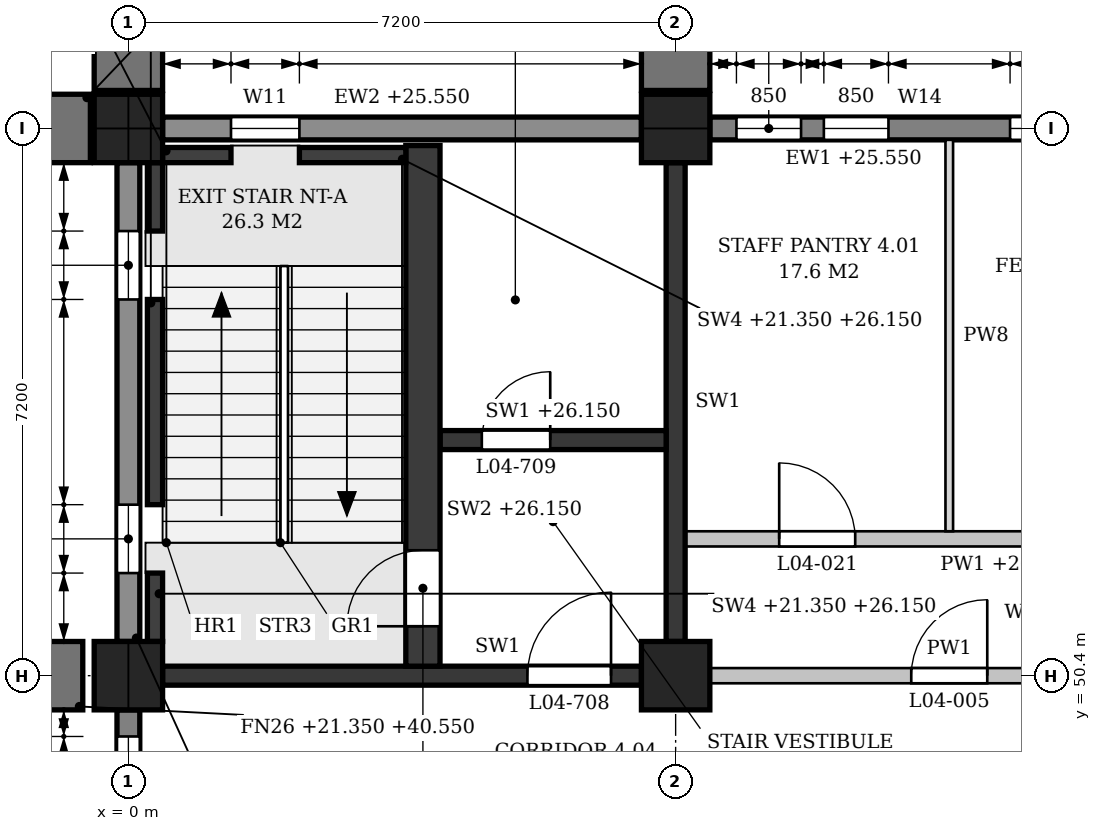
"""IFC4 building model, lengths in metres.
Left out: names, types, materials, properties, quantities, classifications, styles, units other than length and angle.
Written with IfcOpenShell. Run it as: python <this file> out.ifc"""

import sys

from ifc_helpers import new_model, si_unit, direction, frame, frame_2d, origin, origin_2d, place, context, subcontext, project, spatial, polyline, rectangle, outline, extrude, element, fill, save


model = new_model("IFC4")
c1 = context("Model", 3, precision=1e-05, world=origin(), true_north=direction((0.0, 1.0)))
c2 = subcontext(c1, "Body", "Model", "MODEL_VIEW")
j1 = project(units=[si_unit("LENGTHUNIT", "METRE"), si_unit("PLANEANGLEUNIT", "RADIAN")], contexts=[c1])
p1 = place(None, origin())
s1 = spatial("IfcSite", under=j1, at=p1, CompositionType="ELEMENT")
p2 = place(p1, origin())
s2 = spatial("IfcBuilding", under=s1, at=p2, CompositionType="ELEMENT")
p3 = place(p2, frame((0.0, 0.0, 21.6)))
s3 = spatial("IfcBuildingStorey", under=s2, at=p3, CompositionType="ELEMENT", Elevation=21.6)
for number, where, z_axis, x_axis in (
    (1, (0.0, 50.4, 0.0), (0.0, 0.0, 1.0), (1.0, 0.0, 0.0)),
    (2, (0.0, 57.6, 0.0), (0.0, 0.0, 1.0), (1.0, 0.0, 0.0)),
    (3, (7.2, 50.4, 0.0), (0.0, 0.0, 1.0), (1.0, 0.0, 0.0)),
    (4, (7.2, 57.6, 0.0), (0.0, 0.0, 1.0), (1.0, 0.0, 0.0)),
):
    element("IfcColumn", number, at=place(p3, frame(where, z_axis=z_axis, x_axis=x_axis)), inside=s3, PredefinedType="COLUMN", context=c2, shape_type="SweptSolid", body=[
        extrude(rectangle(XDim=0.9, YDim=0.9, at=origin_2d()), origin(), (0.0, 0.0, 1.0), 4.8),
    ])
p4 = place(p3, frame((0.0, 43.65, 0.0), z_axis=(0.0, 0.0, 1.0), x_axis=(0.0, 1.0, 0.0)))
e5 = element("IfcWall", 5, at=p4, inside=s3, PredefinedType="STANDARD", context=c2, shape_type="SweptSolid", body=[
    extrude(rectangle(XDim=6.3, YDim=0.3, at=frame_2d((3.15, 0.0))), origin(), (0.0, 0.0, 1.0), 3.95),
])
p5 = place(p4, frame((0.35, 0.0, 0.9)))
e6 = element("IfcOpeningElement", 6, at=p5, cuts=e5, PredefinedType="OPENING", context=c2, shape_type="SweptSolid", body=[
    extrude(outline(polyline([(0.0, 0.0), (0.85, 0.0), (0.85, 2.05), (0.425, 2.5), (0.0, 2.05), (0.0, 0.0)])), frame((0.0, 0.16, 0.0), z_axis=(0.0, -1.0, 0.0), x_axis=(1.0, 0.0, 0.0)), (0.0, 0.0, 1.0), 0.32),
])
p6 = place(p4, frame((1.5, 0.0, 0.9)))
e7 = element("IfcOpeningElement", 7, at=p6, cuts=e5, PredefinedType="OPENING", context=c2, shape_type="SweptSolid", body=[
    extrude(outline(polyline([(0.0, 0.0), (0.85, 0.0), (0.85, 2.05), (0.425, 2.5), (0.0, 2.05), (0.0, 0.0)])), frame((0.0, 0.16, 0.0), z_axis=(0.0, -1.0, 0.0), x_axis=(1.0, 0.0, 0.0)), (0.0, 0.0, 1.0), 0.32),
])
p7 = place(p4, frame((3.95, 0.0, 0.9)))
e8 = element("IfcOpeningElement", 8, at=p7, cuts=e5, PredefinedType="OPENING", context=c2, shape_type="SweptSolid", body=[
    extrude(outline(polyline([(0.0, 0.0), (0.85, 0.0), (0.85, 2.05), (0.425, 2.5), (0.0, 2.05), (0.0, 0.0)])), frame((0.0, 0.16, 0.0), z_axis=(0.0, -1.0, 0.0), x_axis=(1.0, 0.0, 0.0)), (0.0, 0.0, 1.0), 0.32),
])
p8 = place(p4, frame((5.1, 0.0, 0.9)))
e9 = element("IfcOpeningElement", 9, at=p8, cuts=e5, PredefinedType="OPENING", context=c2, shape_type="SweptSolid", body=[
    extrude(outline(polyline([(0.0, 0.0), (0.85, 0.0), (0.85, 2.05), (0.425, 2.5), (0.0, 2.05), (0.0, 0.0)])), frame((0.0, 0.16, 0.0), z_axis=(0.0, -1.0, 0.0), x_axis=(1.0, 0.0, 0.0)), (0.0, 0.0, 1.0), 0.32),
])
p9 = place(p3, frame((0.0, 50.85, 0.0), z_axis=(0.0, 0.0, 1.0), x_axis=(0.0, 1.0, 0.0)))
e10 = element("IfcWall", 10, at=p9, inside=s3, PredefinedType="STANDARD", context=c2, shape_type="SweptSolid", body=[
    extrude(rectangle(XDim=6.3, YDim=0.3, at=frame_2d((3.15, 0.0))), origin(), (0.0, 0.0, 1.0), 3.95),
])
p10 = place(p9, frame((0.9, 0.0, 0.9)))
e11 = element("IfcOpeningElement", 11, at=p10, cuts=e10, PredefinedType="OPENING", context=c2, shape_type="SweptSolid", body=[
    extrude(outline(polyline([(0.0, 0.0), (0.9, 0.0), (0.9, 2.05), (0.45, 2.5), (0.0, 2.05), (0.0, 0.0)])), frame((0.0, 0.16, 0.0), z_axis=(0.0, -1.0, 0.0), x_axis=(1.0, 0.0, 0.0)), (0.0, 0.0, 1.0), 0.32),
])
p11 = place(p9, frame((4.5, 0.0, 0.9)))
e12 = element("IfcOpeningElement", 12, at=p11, cuts=e10, PredefinedType="OPENING", context=c2, shape_type="SweptSolid", body=[
    extrude(outline(polyline([(0.0, 0.0), (0.9, 0.0), (0.9, 2.05), (0.45, 2.5), (0.0, 2.05), (0.0, 0.0)])), frame((0.0, 0.16, 0.0), z_axis=(0.0, -1.0, 0.0), x_axis=(1.0, 0.0, 0.0)), (0.0, 0.0, 1.0), 0.32),
])
p12 = place(p3, frame((13.95, 57.6, 0.0), z_axis=(0.0, 0.0, 1.0), x_axis=(-1.0, 0.0, 0.0)))
e13 = element("IfcWall", 13, at=p12, inside=s3, PredefinedType="STANDARD", context=c2, shape_type="SweptSolid", body=[
    extrude(rectangle(XDim=6.3, YDim=0.3, at=frame_2d((3.15, 0.0))), origin(), (0.0, 0.0, 1.0), 3.95),
])
p13 = place(p12, frame((0.35, 0.0, 0.9)))
e14 = element("IfcOpeningElement", 14, at=p13, cuts=e13, PredefinedType="OPENING", context=c2, shape_type="SweptSolid", body=[
    extrude(outline(polyline([(0.0, 0.0), (0.85, 0.0), (0.85, 2.05), (0.425, 2.5), (0.0, 2.05), (0.0, 0.0)])), frame((0.0, 0.16, 0.0), z_axis=(0.0, -1.0, 0.0), x_axis=(1.0, 0.0, 0.0)), (0.0, 0.0, 1.0), 0.32),
])
p14 = place(p12, frame((1.5, 0.0, 0.9)))
e15 = element("IfcOpeningElement", 15, at=p14, cuts=e13, PredefinedType="OPENING", context=c2, shape_type="SweptSolid", body=[
    extrude(outline(polyline([(0.0, 0.0), (0.85, 0.0), (0.85, 2.05), (0.425, 2.5), (0.0, 2.05), (0.0, 0.0)])), frame((0.0, 0.16, 0.0), z_axis=(0.0, -1.0, 0.0), x_axis=(1.0, 0.0, 0.0)), (0.0, 0.0, 1.0), 0.32),
])
p15 = place(p12, frame((3.95, 0.0, 0.9)))
e16 = element("IfcOpeningElement", 16, at=p15, cuts=e13, PredefinedType="OPENING", context=c2, shape_type="SweptSolid", body=[
    extrude(outline(polyline([(0.0, 0.0), (0.85, 0.0), (0.85, 2.05), (0.425, 2.5), (0.0, 2.05), (0.0, 0.0)])), frame((0.0, 0.16, 0.0), z_axis=(0.0, -1.0, 0.0), x_axis=(1.0, 0.0, 0.0)), (0.0, 0.0, 1.0), 0.32),
])
p16 = place(p12, frame((5.1, 0.0, 0.9)))
e17 = element("IfcOpeningElement", 17, at=p16, cuts=e13, PredefinedType="OPENING", context=c2, shape_type="SweptSolid", body=[
    extrude(outline(polyline([(0.0, 0.0), (0.85, 0.0), (0.85, 2.05), (0.425, 2.5), (0.0, 2.05), (0.0, 0.0)])), frame((0.0, 0.16, 0.0), z_axis=(0.0, -1.0, 0.0), x_axis=(1.0, 0.0, 0.0)), (0.0, 0.0, 1.0), 0.32),
])
p17 = place(p3, frame((6.75, 57.6, 0.0), z_axis=(0.0, 0.0, 1.0), x_axis=(-1.0, 0.0, 0.0)))
e18 = element("IfcWall", 18, at=p17, inside=s3, PredefinedType="STANDARD", context=c2, shape_type="SweptSolid", body=[
    extrude(rectangle(XDim=6.3, YDim=0.3, at=frame_2d((3.15, 0.0))), origin(), (0.0, 0.0, 1.0), 3.95),
])
p18 = place(p17, frame((4.5, 0.0, 0.9)))
e19 = element("IfcOpeningElement", 19, at=p18, cuts=e18, PredefinedType="OPENING", context=c2, shape_type="SweptSolid", body=[
    extrude(outline(polyline([(0.0, 0.0), (0.9, 0.0), (0.9, 2.05), (0.45, 2.5), (0.0, 2.05), (0.0, 0.0)])), frame((0.0, 0.16, 0.0), z_axis=(0.0, -1.0, 0.0), x_axis=(1.0, 0.0, 0.0)), (0.0, 0.0, 1.0), 0.32),
])
for number, where, z_axis, x_axis in (
    (20, (-0.6, 50.4, -0.25), (0.0, 0.0, 1.0), (-1.0, 0.0, 0.0)),
    (21, (-0.5, 57.6, -0.25), (0.0, 0.0, 1.0), (-1.0, 0.0, 0.0)),
    (22, (0.0, 58.1, -0.25), (0.0, 0.0, 1.0), (0.0, 1.0, 0.0)),
    (23, (7.2, 58.1, -0.25), (0.0, 0.0, 1.0), (0.0, 1.0, 0.0)),
):
    element("IfcWall", number, at=place(p3, frame(where, z_axis=z_axis, x_axis=x_axis)), inside=s3, PredefinedType="POLYGONAL", context=c2, shape_type="SweptSolid", body=[
        extrude(outline(polyline([(1.3, 0.0), (1.3, 18.9), (1.1, 19.2), (0.0, 19.2), (0.0, 0.0), (1.3, 0.0)])), frame((0.0, 0.45, 0.0), z_axis=(0.0, -1.0, 0.0), x_axis=(1.0, 0.0, 0.0)), (0.0, 0.0, 1.0), 0.9),
    ])
p19 = place(p3, frame((0.45, 50.4, 0.0), z_axis=(0.0, 0.0, 1.0), x_axis=(1.0, 0.0, 0.0)))
e24 = element("IfcWall", 24, at=p19, inside=s3, PredefinedType="SHEAR", context=c2, shape_type="SweptSolid", body=[
    extrude(rectangle(XDim=6.3, YDim=0.25, at=frame_2d((3.15, 0.0))), origin(), (0.0, 0.0, 1.0), 3.8),
])
p20 = place(p19, frame((4.8, 0.0, 0.0)))
e25 = element("IfcOpeningElement", 25, at=p20, cuts=e24, PredefinedType="OPENING", context=c2, shape_type="SweptSolid", body=[
    extrude(rectangle(XDim=1.1, YDim=2.1, at=frame_2d((0.55, 1.05))), frame((0.0, 0.135, 0.0), z_axis=(0.0, -1.0, 0.0), x_axis=(1.0, 0.0, 0.0)), (0.0, 0.0, 1.0), 0.27),
])
p21 = place(p3, frame((7.2, 50.85, 0.0), z_axis=(0.0, 0.0, 1.0), x_axis=(0.0, 1.0, 0.0)))
e26 = element("IfcWall", 26, at=p21, inside=s3, PredefinedType="SHEAR", context=c2, shape_type="SweptSolid", body=[
    extrude(rectangle(XDim=6.3, YDim=0.25, at=frame_2d((3.15, 0.0))), origin(), (0.0, 0.0, 1.0), 3.8),
])
p22 = place(p3, frame((0.35, 50.85, -0.25), z_axis=(0.0, 0.0, 1.0), x_axis=(0.0, 1.0, 0.0)))
e27 = element("IfcWall", 27, at=p22, inside=s3, PredefinedType="SHEAR", context=c2, shape_type="SweptSolid", body=[
    extrude(rectangle(XDim=0.9, YDim=0.2, at=frame_2d((0.45, 0.0))), origin(), (0.0, 0.0, 1.0), 4.8),
])
p23 = place(p3, frame((0.35, 52.65, -0.25), z_axis=(0.0, 0.0, 1.0), x_axis=(0.0, 1.0, 0.0)))
e28 = element("IfcWall", 28, at=p23, inside=s3, PredefinedType="SHEAR", context=c2, shape_type="SweptSolid", body=[
    extrude(rectangle(XDim=2.7, YDim=0.2, at=frame_2d((1.35, 0.0))), origin(), (0.0, 0.0, 1.0), 4.8),
])
p24 = place(p3, frame((0.35, 56.25, -0.25), z_axis=(0.0, 0.0, 1.0), x_axis=(0.0, 1.0, 0.0)))
e29 = element("IfcWall", 29, at=p24, inside=s3, PredefinedType="SHEAR", context=c2, shape_type="SweptSolid", body=[
    extrude(rectangle(XDim=0.9, YDim=0.2, at=frame_2d((0.45, 0.0))), origin(), (0.0, 0.0, 1.0), 4.8),
])
p25 = place(p3, frame((0.45, 57.25, -0.25), z_axis=(0.0, 0.0, 1.0), x_axis=(1.0, 0.0, 0.0)))
e30 = element("IfcWall", 30, at=p25, inside=s3, PredefinedType="SHEAR", context=c2, shape_type="SweptSolid", body=[
    extrude(rectangle(XDim=0.9, YDim=0.2, at=frame_2d((0.45, 0.0))), origin(), (0.0, 0.0, 1.0), 4.8),
])
p26 = place(p3, frame((2.25, 57.25, -0.25), z_axis=(0.0, 0.0, 1.0), x_axis=(1.0, 0.0, 0.0)))
e31 = element("IfcWall", 31, at=p26, inside=s3, PredefinedType="SHEAR", context=c2, shape_type="SweptSolid", body=[
    extrude(rectangle(XDim=1.4, YDim=0.2, at=frame_2d((0.7, 0.0))), origin(), (0.0, 0.0, 1.0), 4.8),
])
p27 = place(p3, frame((3.875, 50.525, 0.0), z_axis=(0.0, 0.0, 1.0), x_axis=(0.0, 1.0, 0.0)))
e32 = element("IfcWall", 32, at=p27, inside=s3, PredefinedType="SHEAR", context=c2, shape_type="SweptSolid", body=[
    extrude(rectangle(XDim=6.85, YDim=0.45, at=frame_2d((3.425, 0.0))), origin(), (0.0, 0.0, 1.0), 4.55),
])
p28 = place(p27, frame((0.525, 0.0, 0.0)))
e33 = element("IfcOpeningElement", 33, at=p28, cuts=e32, PredefinedType="OPENING", context=c2, shape_type="SweptSolid", body=[
    extrude(rectangle(XDim=1.0, YDim=2.1, at=frame_2d((0.5, 1.05))), frame((0.0, 0.235, 0.0), z_axis=(0.0, -1.0, 0.0), x_axis=(1.0, 0.0, 0.0)), (0.0, 0.0, 1.0), 0.47),
])
p29 = place(p3, frame((4.1, 53.5, 0.0), z_axis=(0.0, 0.0, 1.0), x_axis=(1.0, 0.0, 0.0)))
e34 = element("IfcWall", 34, at=p29, inside=s3, PredefinedType="SHEAR", context=c2, shape_type="SweptSolid", body=[
    extrude(rectangle(XDim=2.975, YDim=0.25, at=frame_2d((1.487, 0.0))), origin(), (0.0, 0.0, 1.0), 4.55),
])
p30 = place(p29, frame((0.55, 0.0, 0.0)))
e35 = element("IfcOpeningElement", 35, at=p30, cuts=e34, PredefinedType="OPENING", context=c2, shape_type="SweptSolid", body=[
    extrude(rectangle(XDim=0.9, YDim=2.1, at=frame_2d((0.45, 1.05))), frame((0.0, 0.135, 0.0), z_axis=(0.0, -1.0, 0.0), x_axis=(1.0, 0.0, 0.0)), (0.0, 0.0, 1.0), 0.27),
])
p31 = place(p3, frame((7.65, 50.4, 0.0), z_axis=(0.0, 0.0, 1.0), x_axis=(1.0, 0.0, 0.0)))
e36 = element("IfcWall", 36, at=p31, inside=s3, PredefinedType="PARTITIONING", context=c2, shape_type="SweptSolid", body=[
    extrude(rectangle(XDim=6.3, YDim=0.2, at=frame_2d((3.15, 0.0))), origin(), (0.0, 0.0, 1.0), 3.8),
])
p32 = place(p31, frame((2.65, 0.0, 0.0)))
e37 = element("IfcOpeningElement", 37, at=p32, cuts=e36, PredefinedType="OPENING", context=c2, shape_type="SweptSolid", body=[
    extrude(rectangle(XDim=1.0, YDim=2.1, at=frame_2d((0.5, 1.05))), frame((0.0, 0.11, 0.0), z_axis=(0.0, -1.0, 0.0), x_axis=(1.0, 0.0, 0.0)), (0.0, 0.0, 1.0), 0.22),
])
p33 = place(p3, frame((7.325, 52.2, 0.0), z_axis=(0.0, 0.0, 1.0), x_axis=(1.0, 0.0, 0.0)))
e38 = element("IfcWall", 38, at=p33, inside=s3, PredefinedType="PARTITIONING", context=c2, shape_type="SweptSolid", body=[
    extrude(outline(polyline([(0.0, 0.0), (14.15, 0.0), (14.15, 3.8), (14.025, 3.8), (14.025, 4.55), (7.325, 4.55), (7.325, 3.8), (6.825, 3.8), (6.825, 4.55), (0.125, 4.55), (0.125, 3.8), (0.0, 3.8), (0.0, 0.0)])), frame((0.0, 0.1, 0.0), z_axis=(0.0, -1.0, 0.0), x_axis=(1.0, 0.0, 0.0)), (0.0, 0.0, 1.0), 0.2),
])
p34 = place(p33, frame((1.238, 0.0, 0.0)))
e39 = element("IfcOpeningElement", 39, at=p34, cuts=e38, PredefinedType="OPENING", context=c2, shape_type="SweptSolid", body=[
    extrude(rectangle(XDim=1.0, YDim=2.1, at=frame_2d((0.5, 1.05))), frame((0.0, 0.11, 0.0), z_axis=(0.0, -1.0, 0.0), x_axis=(1.0, 0.0, 0.0)), (0.0, 0.0, 1.0), 0.22),
])
p35 = place(p33, frame((4.775, 0.0, 0.0)))
e40 = element("IfcOpeningElement", 40, at=p35, cuts=e38, PredefinedType="OPENING", context=c2, shape_type="SweptSolid", body=[
    extrude(rectangle(XDim=1.0, YDim=2.1, at=frame_2d((0.5, 1.05))), frame((0.0, 0.11, 0.0), z_axis=(0.0, -1.0, 0.0), x_axis=(1.0, 0.0, 0.0)), (0.0, 0.0, 1.0), 0.22),
])
p36 = place(p33, frame((8.375, 0.0, 0.0)))
e41 = element("IfcOpeningElement", 41, at=p36, cuts=e38, PredefinedType="OPENING", context=c2, shape_type="SweptSolid", body=[
    extrude(rectangle(XDim=1.0, YDim=2.1, at=frame_2d((0.5, 1.05))), frame((0.0, 0.11, 0.0), z_axis=(0.0, -1.0, 0.0), x_axis=(1.0, 0.0, 0.0)), (0.0, 0.0, 1.0), 0.22),
])
p37 = place(p33, frame((11.913, 0.0, 0.0)))
e42 = element("IfcOpeningElement", 42, at=p37, cuts=e38, PredefinedType="OPENING", context=c2, shape_type="SweptSolid", body=[
    extrude(rectangle(XDim=1.0, YDim=2.1, at=frame_2d((0.5, 1.05))), frame((0.0, 0.11, 0.0), z_axis=(0.0, -1.0, 0.0), x_axis=(1.0, 0.0, 0.0)), (0.0, 0.0, 1.0), 0.22),
])
p38 = place(p3, frame((10.8, 52.3, 0.0), z_axis=(0.0, 0.0, 1.0), x_axis=(0.0, 1.0, 0.0)))
e43 = element("IfcWall", 43, at=p38, inside=s3, PredefinedType="PARTITIONING", context=c2, shape_type="SweptSolid", body=[
    extrude(rectangle(XDim=5.15, YDim=0.1, at=frame_2d((2.575, 0.0))), origin(), (0.0, 0.0, 1.0), 3.8),
])
p39 = place(p14, origin())
e44 = element("IfcWindow", 44, at=p39, inside=s3, PartitioningType="SINGLE_PANEL", PredefinedType="WINDOW", context=c2, shape_type="SweptSolid", body=[
    extrude(outline(polyline([(0.0, 0.0), (0.85, 0.0), (0.85, 2.05), (0.425, 2.5), (0.0, 2.05), (0.0, 0.0)])), frame((0.0, 0.03, 0.0), z_axis=(0.0, -1.0, 0.0), x_axis=(1.0, 0.0, 0.0)), (0.0, 0.0, 1.0), 0.06),
])
fill(e15, e44)
p40 = place(p15, origin())
e45 = element("IfcWindow", 45, at=p40, inside=s3, PartitioningType="SINGLE_PANEL", PredefinedType="WINDOW", context=c2, shape_type="SweptSolid", body=[
    extrude(outline(polyline([(0.0, 0.0), (0.85, 0.0), (0.85, 2.05), (0.425, 2.5), (0.0, 2.05), (0.0, 0.0)])), frame((0.0, 0.03, 0.0), z_axis=(0.0, -1.0, 0.0), x_axis=(1.0, 0.0, 0.0)), (0.0, 0.0, 1.0), 0.06),
])
fill(e16, e45)
p41 = place(p16, origin())
e46 = element("IfcWindow", 46, at=p41, inside=s3, PartitioningType="SINGLE_PANEL", PredefinedType="WINDOW", context=c2, shape_type="SweptSolid", body=[
    extrude(outline(polyline([(0.0, 0.0), (0.85, 0.0), (0.85, 2.05), (0.425, 2.5), (0.0, 2.05), (0.0, 0.0)])), frame((0.0, 0.03, 0.0), z_axis=(0.0, -1.0, 0.0), x_axis=(1.0, 0.0, 0.0)), (0.0, 0.0, 1.0), 0.06),
])
fill(e17, e46)
p42 = place(p18, origin())
e47 = element("IfcWindow", 47, at=p42, inside=s3, PartitioningType="SINGLE_PANEL", PredefinedType="WINDOW", context=c2, shape_type="SweptSolid", body=[
    extrude(outline(polyline([(0.0, 0.0), (0.9, 0.0), (0.9, 2.05), (0.45, 2.5), (0.0, 2.05), (0.0, 0.0)])), frame((0.0, 0.03, 0.0), z_axis=(0.0, -1.0, 0.0), x_axis=(1.0, 0.0, 0.0)), (0.0, 0.0, 1.0), 0.06),
])
fill(e19, e47)
p43 = place(p8, origin())
e48 = element("IfcWindow", 48, at=p43, inside=s3, PartitioningType="SINGLE_PANEL", PredefinedType="WINDOW", context=c2, shape_type="SweptSolid", body=[
    extrude(outline(polyline([(0.0, 0.0), (0.85, 0.0), (0.85, 2.05), (0.425, 2.5), (0.0, 2.05), (0.0, 0.0)])), frame((0.0, 0.03, 0.0), z_axis=(0.0, -1.0, 0.0), x_axis=(1.0, 0.0, 0.0)), (0.0, 0.0, 1.0), 0.06),
])
fill(e9, e48)
p44 = place(p10, origin())
e49 = element("IfcWindow", 49, at=p44, inside=s3, PartitioningType="SINGLE_PANEL", PredefinedType="WINDOW", context=c2, shape_type="SweptSolid", body=[
    extrude(outline(polyline([(0.0, 0.0), (0.9, 0.0), (0.9, 2.05), (0.45, 2.5), (0.0, 2.05), (0.0, 0.0)])), frame((0.0, 0.03, 0.0), z_axis=(0.0, -1.0, 0.0), x_axis=(1.0, 0.0, 0.0)), (0.0, 0.0, 1.0), 0.06),
])
fill(e11, e49)
p45 = place(p11, origin())
e50 = element("IfcWindow", 50, at=p45, inside=s3, PartitioningType="SINGLE_PANEL", PredefinedType="WINDOW", context=c2, shape_type="SweptSolid", body=[
    extrude(outline(polyline([(0.0, 0.0), (0.9, 0.0), (0.9, 2.05), (0.45, 2.5), (0.0, 2.05), (0.0, 0.0)])), frame((0.0, 0.03, 0.0), z_axis=(0.0, -1.0, 0.0), x_axis=(1.0, 0.0, 0.0)), (0.0, 0.0, 1.0), 0.06),
])
fill(e12, e50)
p46 = place(p28, origin())
e51 = element("IfcDoor", 51, at=p46, inside=s3, OperationType="SINGLE_SWING_LEFT", PredefinedType="DOOR", context=c2, shape_type="SweptSolid", body=[
    extrude(rectangle(XDim=1.0, YDim=2.1, at=frame_2d((0.5, 1.05))), frame((0.0, 0.025, 0.0), z_axis=(0.0, -1.0, 0.0), x_axis=(1.0, 0.0, 0.0)), (0.0, 0.0, 1.0), 0.05),
])
fill(e33, e51)
p47 = place(p20, origin())
e52 = element("IfcDoor", 52, at=p47, inside=s3, OperationType="SINGLE_SWING_RIGHT", PredefinedType="DOOR", context=c2, shape_type="SweptSolid", body=[
    extrude(rectangle(XDim=1.1, YDim=2.1, at=frame_2d((0.55, 1.05))), frame((0.0, 0.025, 0.0), z_axis=(0.0, -1.0, 0.0), x_axis=(1.0, 0.0, 0.0)), (0.0, 0.0, 1.0), 0.05),
])
fill(e25, e52)
p48 = place(p30, origin())
e53 = element("IfcDoor", 53, at=p48, inside=s3, OperationType="SINGLE_SWING_RIGHT", PredefinedType="DOOR", context=c2, shape_type="SweptSolid", body=[
    extrude(rectangle(XDim=0.9, YDim=2.1, at=frame_2d((0.45, 1.05))), frame((0.0, 0.025, 0.0), z_axis=(0.0, -1.0, 0.0), x_axis=(1.0, 0.0, 0.0)), (0.0, 0.0, 1.0), 0.05),
])
fill(e35, e53)
p49 = place(p32, origin())
e54 = element("IfcDoor", 54, at=p49, inside=s3, OperationType="SINGLE_SWING_RIGHT", PredefinedType="DOOR", context=c2, shape_type="SweptSolid", body=[
    extrude(rectangle(XDim=1.0, YDim=2.1, at=frame_2d((0.5, 1.05))), frame((0.0, 0.025, 0.0), z_axis=(0.0, -1.0, 0.0), x_axis=(1.0, 0.0, 0.0)), (0.0, 0.0, 1.0), 0.05),
])
fill(e37, e54)
p50 = place(p34, origin())
e55 = element("IfcDoor", 55, at=p50, inside=s3, OperationType="SINGLE_SWING_LEFT", PredefinedType="DOOR", context=c2, shape_type="SweptSolid", body=[
    extrude(rectangle(XDim=1.0, YDim=2.1, at=frame_2d((0.5, 1.05))), frame((0.0, 0.025, 0.0), z_axis=(0.0, -1.0, 0.0), x_axis=(1.0, 0.0, 0.0)), (0.0, 0.0, 1.0), 0.05),
])
fill(e39, e55)
save(model, sys.argv[1])
